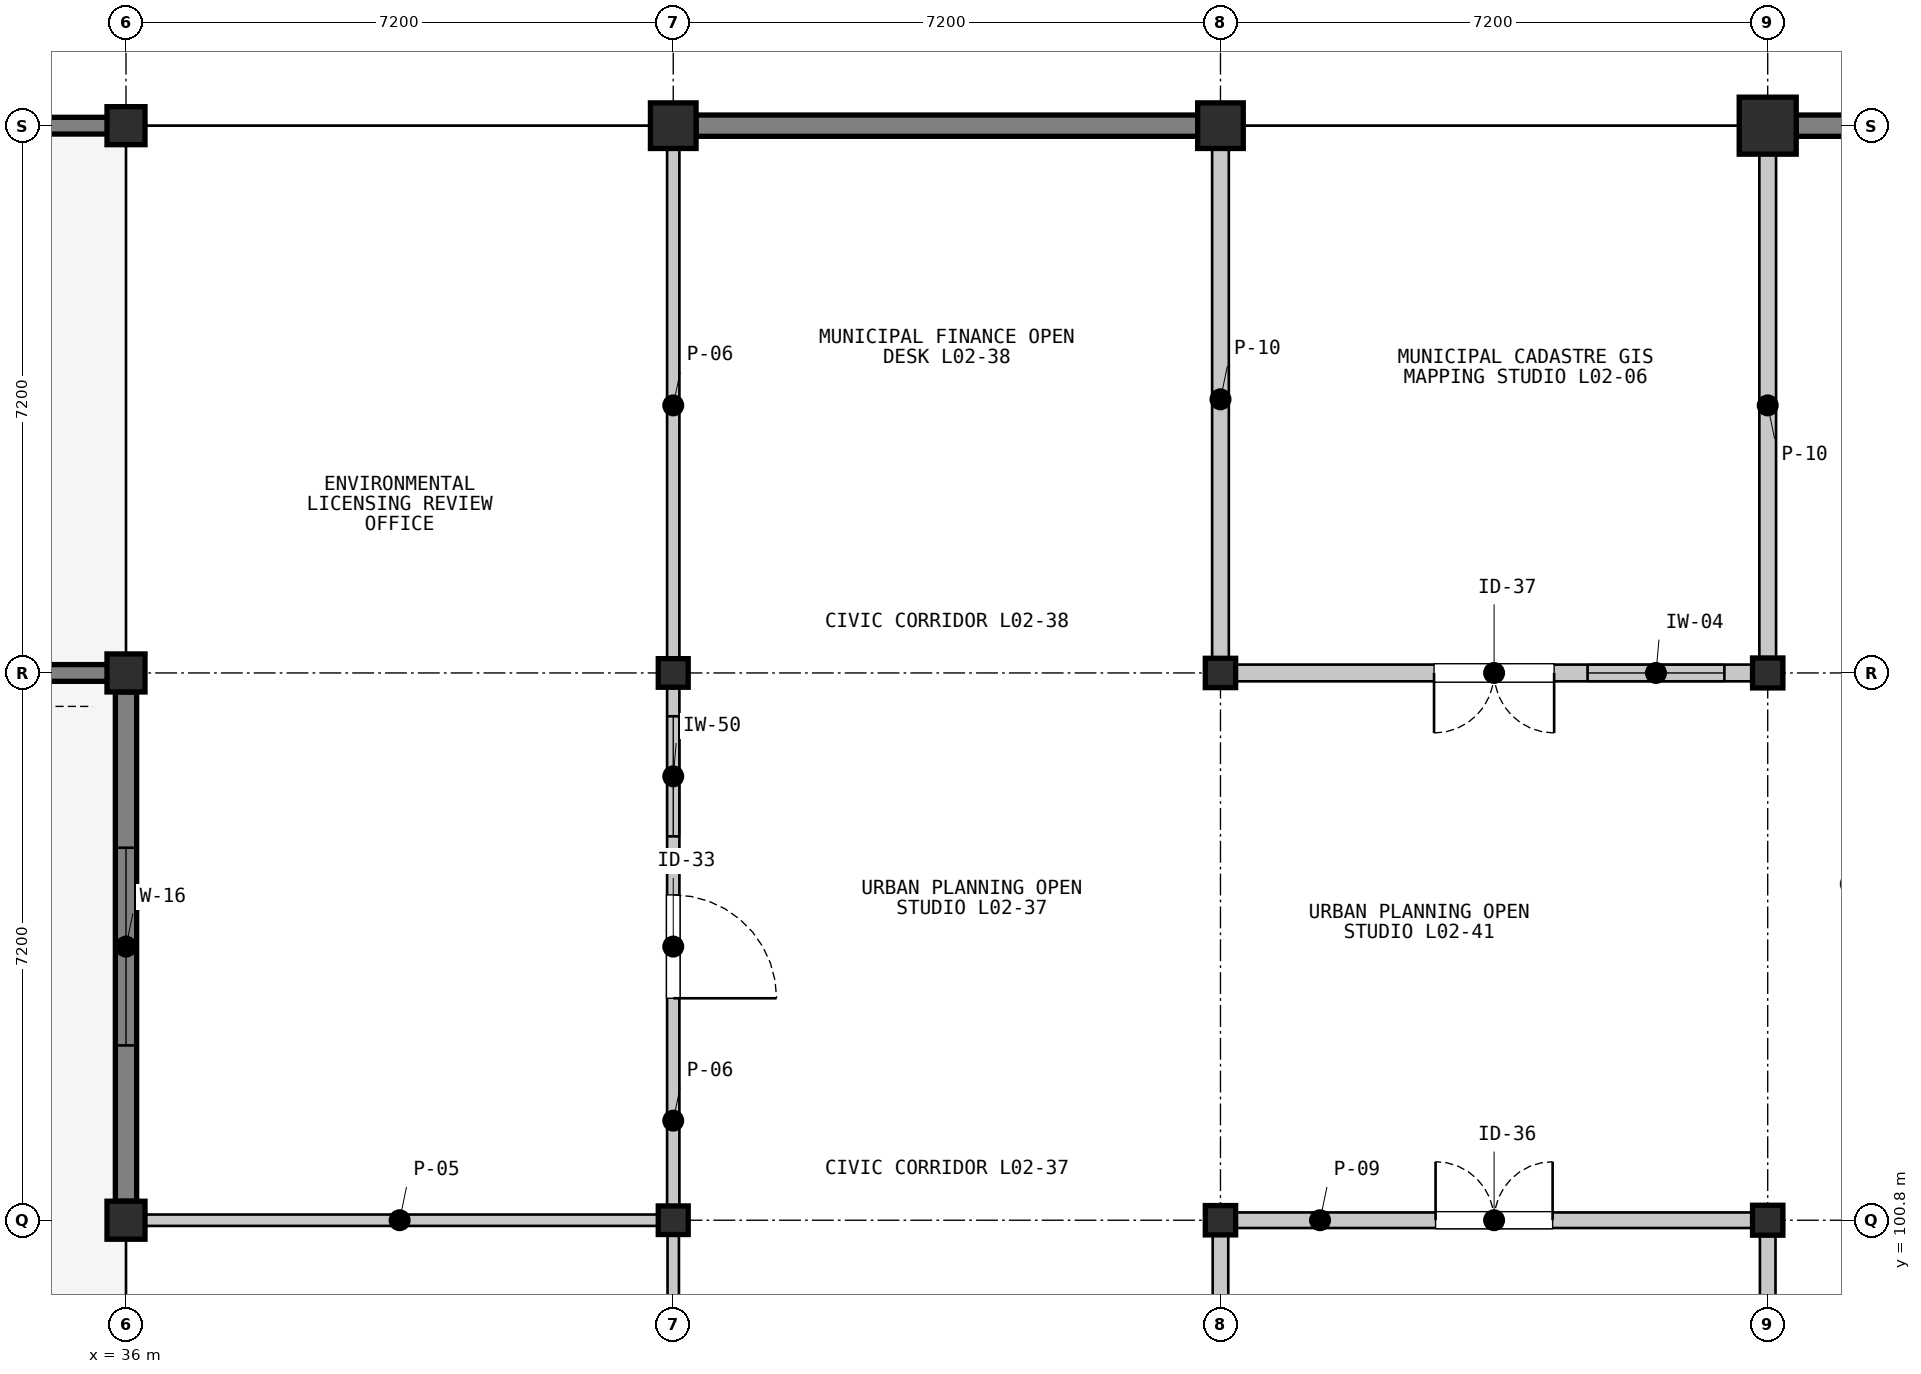
"""IFC4 building model, lengths in metres.
Left out: names, types, materials, properties, quantities, classifications, styles, units other than length and angle.
Written with IfcOpenShell. Run it as: python <this file> out.ifc"""

import sys

from ifc_helpers import new_model, si_unit, direction, frame, frame_2d, origin, origin_2d, place, context, subcontext, project, spatial, rectangle, i_section, extrude, element, fill, save


model = new_model("IFC4")
c1 = context("Model", 3, precision=1e-05, world=origin(), true_north=direction((0.0, 1.0)))
c2 = subcontext(c1, "Body", "Model", "MODEL_VIEW")
j1 = project(units=[si_unit("LENGTHUNIT", "METRE"), si_unit("PLANEANGLEUNIT", "RADIAN")], contexts=[c1])
p1 = place(None, origin())
s1 = spatial("IfcSite", under=j1, at=p1, CompositionType="ELEMENT")
p2 = place(p1, origin())
s2 = spatial("IfcBuilding", under=s1, at=p2, CompositionType="ELEMENT")
p3 = place(p2, frame((0.0, 0.0, 5.4)))
s3 = spatial("IfcBuildingStorey", under=s2, at=p3, CompositionType="ELEMENT", Elevation=5.4)
for number, where, z_axis, x_axis in (
    (1, (36.0, 100.8, 0.0), (0.0, 0.0, 1.0), (1.0, 0.0, 0.0)),
    (2, (36.0, 108.0, 0.0), (0.0, 0.0, 1.0), (1.0, 0.0, 0.0)),
    (3, (36.0, 115.2, 0.0), (0.0, 0.0, 1.0), (1.0, 0.0, 0.0)),
):
    element("IfcColumn", number, at=place(p3, frame(where, z_axis=z_axis, x_axis=x_axis)), inside=s3, PredefinedType="COLUMN", context=c2, shape_type="SweptSolid", body=[
        extrude(rectangle(XDim=0.5, YDim=0.5, at=origin_2d()), origin(), (0.0, 0.0, 1.0), 4.5),
    ])
for number, where, z_axis, x_axis in (
    (4, (43.2, 100.8, 0.0), (0.0, 0.0, 1.0), (1.0, 0.0, 0.0)),
    (5, (43.2, 108.0, 0.0), (0.0, 0.0, 1.0), (1.0, 0.0, 0.0)),
):
    element("IfcColumn", number, at=place(p3, frame(where, z_axis=z_axis, x_axis=x_axis)), inside=s3, PredefinedType="COLUMN", context=c2, shape_type="SweptSolid", body=[
        extrude(i_section(OverallWidth=0.394, OverallDepth=0.376, WebThickness=0.017, FlangeThickness=0.028, FilletRadius=0.015, at=origin_2d()), origin(), (0.0, 0.0, 1.0), 4.5),
    ])
p4 = place(p3, frame((43.2, 115.2, 0.0), z_axis=(0.0, 0.0, 1.0), x_axis=(1.0, 0.0, 0.0)))
e6 = element("IfcColumn", 6, at=p4, inside=s3, PredefinedType="COLUMN", context=c2, shape_type="SweptSolid", body=[
    extrude(rectangle(XDim=0.6, YDim=0.6, at=origin_2d()), origin(), (0.0, 0.0, 1.0), 4.5),
])
for number, where, z_axis, x_axis in (
    (7, (50.4, 100.8, 0.0), (0.0, 0.0, 1.0), (1.0, 0.0, 0.0)),
    (8, (50.4, 108.0, 0.0), (0.0, 0.0, 1.0), (1.0, 0.0, 0.0)),
):
    element("IfcColumn", number, at=place(p3, frame(where, z_axis=z_axis, x_axis=x_axis)), inside=s3, PredefinedType="COLUMN", context=c2, shape_type="SweptSolid", body=[
        extrude(i_section(OverallWidth=0.399, OverallDepth=0.386, WebThickness=0.021, FlangeThickness=0.033, FilletRadius=0.015, at=origin_2d()), origin(), (0.0, 0.0, 1.0), 4.5),
    ])
p5 = place(p3, frame((50.4, 115.2, 0.0), z_axis=(0.0, 0.0, 1.0), x_axis=(1.0, 0.0, 0.0)))
e9 = element("IfcColumn", 9, at=p5, inside=s3, PredefinedType="COLUMN", context=c2, shape_type="SweptSolid", body=[
    extrude(rectangle(XDim=0.6, YDim=0.6, at=origin_2d()), origin(), (0.0, 0.0, 1.0), 4.5),
])
for number, where, z_axis, x_axis in (
    (10, (57.6, 100.8, 0.0), (0.0, 0.0, 1.0), (1.0, 0.0, 0.0)),
    (11, (57.6, 108.0, 0.0), (0.0, 0.0, 1.0), (1.0, 0.0, 0.0)),
):
    element("IfcColumn", number, at=place(p3, frame(where, z_axis=z_axis, x_axis=x_axis)), inside=s3, PredefinedType="COLUMN", context=c2, shape_type="SweptSolid", body=[
        extrude(i_section(OverallWidth=0.399, OverallDepth=0.394, WebThickness=0.023, FlangeThickness=0.037, FilletRadius=0.015, at=origin_2d()), origin(), (0.0, 0.0, 1.0), 4.5),
    ])
p6 = place(p3, frame((57.6, 115.2, 0.0), z_axis=(0.0, 0.0, 1.0), x_axis=(1.0, 0.0, 0.0)))
e12 = element("IfcColumn", 12, at=p6, inside=s3, PredefinedType="COLUMN", context=c2, shape_type="SweptSolid", body=[
    extrude(rectangle(XDim=0.75, YDim=0.75, at=origin_2d()), origin(), (0.0, 0.0, 1.0), 4.5),
])
p7 = place(p3, frame((36.0, 101.05, 0.0), z_axis=(0.0, 0.0, 1.0), x_axis=(0.0, 1.0, 0.0)))
e13 = element("IfcWall", 13, at=p7, inside=s3, PredefinedType="SOLIDWALL", context=c2, shape_type="SweptSolid", body=[
    extrude(rectangle(XDim=6.7, YDim=0.28, at=frame_2d((3.35, 0.0))), origin(), (0.0, 0.0, 1.0), 3.767),
])
p8 = place(p7, frame((2.05, 0.0, 0.95)))
e14 = element("IfcOpeningElement", 14, at=p8, cuts=e13, PredefinedType="OPENING", context=c2, shape_type="SweptSolid", body=[
    extrude(rectangle(XDim=2.6, YDim=1.9, at=frame_2d((1.3, 0.95))), frame((0.0, 0.15, 0.0), z_axis=(0.0, -1.0, 0.0), x_axis=(1.0, 0.0, 0.0)), (0.0, 0.0, 1.0), 0.3),
])
p9 = place(p3, frame((43.5, 115.2, 0.0), z_axis=(0.0, 0.0, 1.0), x_axis=(1.0, 0.0, 0.0)))
e15 = element("IfcWall", 15, at=p9, inside=s3, PredefinedType="SOLIDWALL", context=c2, shape_type="SweptSolid", body=[
    extrude(rectangle(XDim=6.6, YDim=0.28, at=frame_2d((3.3, 0.0))), origin(), (0.0, 0.0, 1.0), 3.698),
])
p10 = place(p3, frame((57.975, 115.2, 0.0), z_axis=(0.0, 0.0, 1.0), x_axis=(1.0, 0.0, 0.0)))
e16 = element("IfcWall", 16, at=p10, inside=s3, PredefinedType="SOLIDWALL", context=c2, shape_type="SweptSolid", body=[
    extrude(rectangle(XDim=6.45, YDim=0.28, at=frame_2d((3.225, 0.0))), origin(), (0.0, 0.0, 1.0), 3.698),
])
for number, where, z_axis, x_axis in (
    (17, (28.95, 115.2, 0.0), (0.0, 0.0, 1.0), (1.0, 0.0, 0.0)),
    (18, (35.85, 108.0, 0.0), (0.0, 0.0, 1.0), (-1.0, 0.0, 0.0)),
):
    element("IfcWall", number, at=place(p3, frame(where, z_axis=z_axis, x_axis=x_axis)), inside=s3, PredefinedType="PARAPET", context=c2, shape_type="SweptSolid", body=[
        extrude(rectangle(XDim=6.9, YDim=0.22, at=frame_2d((3.45, 0.0))), origin(), (0.0, 0.0, 1.0), 0.85),
    ])
p11 = place(p3, frame((36.12, 100.8, 0.0), z_axis=(0.0, 0.0, 1.0), x_axis=(1.0, 0.0, 0.0)))
e19 = element("IfcWall", 19, at=p11, inside=s3, PredefinedType="PARTITIONING", context=c2, shape_type="SweptSolid", body=[
    extrude(rectangle(XDim=6.96, YDim=0.15, at=frame_2d((3.48, 0.0))), origin(), (0.0, 0.0, 1.0), 3.688),
])
p12 = place(p3, frame((43.2, 100.68, 0.0), z_axis=(0.0, 0.0, 1.0), x_axis=(0.0, -1.0, 0.0)))
e20 = element("IfcWall", 20, at=p12, inside=s3, PredefinedType="PARTITIONING", context=c2, shape_type="SweptSolid", body=[
    extrude(rectangle(XDim=6.8, YDim=0.15, at=frame_2d((3.4, 0.0))), origin(), (0.0, 0.0, 1.0), 3.688),
])
p13 = place(p3, frame((43.2, 107.88, 0.0), z_axis=(0.0, 0.0, 1.0), x_axis=(0.0, -1.0, 0.0)))
e21 = element("IfcWall", 21, at=p13, inside=s3, PredefinedType="PARTITIONING", context=c2, shape_type="SweptSolid", body=[
    extrude(rectangle(XDim=6.96, YDim=0.162, at=frame_2d((3.48, 0.0))), origin(), (0.0, 0.0, 1.0), 3.688),
])
p14 = place(p13, frame((2.8, 0.0, 0.0)))
e22 = element("IfcOpeningElement", 22, at=p14, cuts=e21, PredefinedType="OPENING", context=c2, shape_type="SweptSolid", body=[
    extrude(rectangle(XDim=1.36, YDim=2.24, at=frame_2d((0.68, 1.12))), frame((0.0, 0.091, 0.0), z_axis=(0.0, -1.0, 0.0), x_axis=(1.0, 0.0, 0.0)), (0.0, 0.0, 1.0), 0.182),
])
p15 = place(p13, frame((0.45, 0.0, 1.05)))
e23 = element("IfcOpeningElement", 23, at=p15, cuts=e21, PredefinedType="OPENING", context=c2, shape_type="SweptSolid", body=[
    extrude(rectangle(XDim=1.58, YDim=1.48, at=frame_2d((0.79, 0.74))), frame((0.0, 0.091, 0.0), z_axis=(0.0, -1.0, 0.0), x_axis=(1.0, 0.0, 0.0)), (0.0, 0.0, 1.0), 0.182),
])
p16 = place(p3, frame((43.2, 114.92, 0.0), z_axis=(0.0, 0.0, 1.0), x_axis=(0.0, -1.0, 0.0)))
e24 = element("IfcWall", 24, at=p16, inside=s3, PredefinedType="PARTITIONING", context=c2, shape_type="SweptSolid", body=[
    extrude(rectangle(XDim=6.8, YDim=0.162, at=frame_2d((3.4, 0.0))), origin(), (0.0, 0.0, 1.0), 3.688),
])
p17 = place(p3, frame((50.52, 100.8, 0.0), z_axis=(0.0, 0.0, 1.0), x_axis=(1.0, 0.0, 0.0)))
e25 = element("IfcWall", 25, at=p17, inside=s3, PredefinedType="PARTITIONING", context=c2, shape_type="SweptSolid", body=[
    extrude(rectangle(XDim=6.96, YDim=0.205, at=frame_2d((3.48, 0.0))), origin(), (0.0, 0.0, 1.0), 3.688),
])
p18 = place(p17, frame((2.71, 0.0, 0.0)))
e26 = element("IfcOpeningElement", 26, at=p18, cuts=e25, PredefinedType="OPENING", context=c2, shape_type="SweptSolid", body=[
    extrude(rectangle(XDim=1.54, YDim=2.28, at=frame_2d((0.77, 1.14))), frame((0.0, 0.113, 0.0), z_axis=(0.0, -1.0, 0.0), x_axis=(1.0, 0.0, 0.0)), (0.0, 0.0, 1.0), 0.225),
])
p19 = place(p3, frame((50.4, 93.72, 0.0), z_axis=(0.0, 0.0, 1.0), x_axis=(0.0, 1.0, 0.0)))
e27 = element("IfcWall", 27, at=p19, inside=s3, PredefinedType="PARTITIONING", context=c2, shape_type="SweptSolid", body=[
    extrude(rectangle(XDim=6.96, YDim=0.205, at=frame_2d((3.48, 0.0))), origin(), (0.0, 0.0, 1.0), 3.688),
])
p20 = place(p3, frame((57.6, 100.68, 0.0), z_axis=(0.0, 0.0, 1.0), x_axis=(0.0, -1.0, 0.0)))
e28 = element("IfcWall", 28, at=p20, inside=s3, PredefinedType="PARTITIONING", context=c2, shape_type="SweptSolid", body=[
    extrude(rectangle(XDim=6.8, YDim=0.205, at=frame_2d((3.4, 0.0))), origin(), (0.0, 0.0, 1.0), 3.688),
])
p21 = place(p3, frame((57.48, 108.0, 0.0), z_axis=(0.0, 0.0, 1.0), x_axis=(-1.0, 0.0, 0.0)))
e29 = element("IfcWall", 29, at=p21, inside=s3, PredefinedType="PARTITIONING", context=c2, shape_type="SweptSolid", body=[
    extrude(rectangle(XDim=6.96, YDim=0.22, at=frame_2d((3.48, 0.0))), origin(), (0.0, 0.0, 1.0), 3.688),
])
p22 = place(p21, frame((2.69, 0.0, 0.0)))
e30 = element("IfcOpeningElement", 30, at=p22, cuts=e29, PredefinedType="OPENING", context=c2, shape_type="SweptSolid", body=[
    extrude(rectangle(XDim=1.58, YDim=2.28, at=frame_2d((0.79, 1.14))), frame((0.0, 0.12, 0.0), z_axis=(0.0, -1.0, 0.0), x_axis=(1.0, 0.0, 0.0)), (0.0, 0.0, 1.0), 0.24),
])
p23 = place(p21, frame((0.45, 0.0, 1.05)))
e31 = element("IfcOpeningElement", 31, at=p23, cuts=e29, PredefinedType="OPENING", context=c2, shape_type="SweptSolid", body=[
    extrude(rectangle(XDim=1.8, YDim=1.4, at=frame_2d((0.9, 0.7))), frame((0.0, 0.12, 0.0), z_axis=(0.0, -1.0, 0.0), x_axis=(1.0, 0.0, 0.0)), (0.0, 0.0, 1.0), 0.24),
])
p24 = place(p3, frame((50.4, 108.12, 0.0), z_axis=(0.0, 0.0, 1.0), x_axis=(0.0, 1.0, 0.0)))
e32 = element("IfcWall", 32, at=p24, inside=s3, PredefinedType="PARTITIONING", context=c2, shape_type="SweptSolid", body=[
    extrude(rectangle(XDim=6.96, YDim=0.22, at=frame_2d((3.48, 0.0))), origin(), (0.0, 0.0, 1.0), 3.688),
])
p25 = place(p3, frame((57.6, 114.92, 0.0), z_axis=(0.0, 0.0, 1.0), x_axis=(0.0, -1.0, 0.0)))
e33 = element("IfcWall", 33, at=p25, inside=s3, PredefinedType="PARTITIONING", context=c2, shape_type="SweptSolid", body=[
    extrude(rectangle(XDim=6.8, YDim=0.22, at=frame_2d((3.4, 0.0))), origin(), (0.0, 0.0, 1.0), 3.688),
])
p26 = place(p8, origin())
e34 = element("IfcWindow", 34, at=p26, inside=s3, PartitioningType="SINGLE_PANEL", PredefinedType="WINDOW", context=c2, shape_type="SweptSolid", body=[
    extrude(rectangle(XDim=2.6, YDim=1.9, at=frame_2d((1.3, 0.95))), frame((0.0, 0.03, 0.0), z_axis=(0.0, -1.0, 0.0), x_axis=(1.0, 0.0, 0.0)), (0.0, 0.0, 1.0), 0.06),
])
fill(e14, e34)
p27 = place(p14, origin())
e35 = element("IfcDoor", 35, at=p27, inside=s3, OperationType="SINGLE_SWING_RIGHT", PredefinedType="DOOR", context=c2, shape_type="SweptSolid", body=[
    extrude(rectangle(XDim=1.36, YDim=2.24, at=frame_2d((0.68, 1.12))), frame((0.0, 0.025, 0.0), z_axis=(0.0, -1.0, 0.0), x_axis=(1.0, 0.0, 0.0)), (0.0, 0.0, 1.0), 0.05),
])
fill(e22, e35)
p28 = place(p15, origin())
e36 = element("IfcWindow", 36, at=p28, inside=s3, PartitioningType="SINGLE_PANEL", PredefinedType="WINDOW", context=c2, shape_type="SweptSolid", body=[
    extrude(rectangle(XDim=1.58, YDim=1.48, at=frame_2d((0.79, 0.74))), frame((0.0, 0.03, 0.0), z_axis=(0.0, -1.0, 0.0), x_axis=(1.0, 0.0, 0.0)), (0.0, 0.0, 1.0), 0.06),
])
fill(e23, e36)
p29 = place(p18, origin())
e37 = element("IfcDoor", 37, at=p29, inside=s3, OperationType="DOUBLE_DOOR_SINGLE_SWING", PredefinedType="DOOR", context=c2, shape_type="SweptSolid", body=[
    extrude(rectangle(XDim=1.54, YDim=2.28, at=frame_2d((0.77, 1.14))), frame((0.0, 0.025, 0.0), z_axis=(0.0, -1.0, 0.0), x_axis=(1.0, 0.0, 0.0)), (0.0, 0.0, 1.0), 0.05),
])
fill(e26, e37)
p30 = place(p22, origin())
e38 = element("IfcDoor", 38, at=p30, inside=s3, OperationType="DOUBLE_DOOR_SINGLE_SWING", PredefinedType="DOOR", context=c2, shape_type="SweptSolid", body=[
    extrude(rectangle(XDim=1.58, YDim=2.28, at=frame_2d((0.79, 1.14))), frame((0.0, 0.025, 0.0), z_axis=(0.0, -1.0, 0.0), x_axis=(1.0, 0.0, 0.0)), (0.0, 0.0, 1.0), 0.05),
])
fill(e30, e38)
p31 = place(p23, origin())
e39 = element("IfcWindow", 39, at=p31, inside=s3, PartitioningType="SINGLE_PANEL", PredefinedType="WINDOW", context=c2, shape_type="SweptSolid", body=[
    extrude(rectangle(XDim=1.8, YDim=1.4, at=frame_2d((0.9, 0.7))), frame((0.0, 0.03, 0.0), z_axis=(0.0, -1.0, 0.0), x_axis=(1.0, 0.0, 0.0)), (0.0, 0.0, 1.0), 0.06),
])
fill(e31, e39)
save(model, sys.argv[1])
